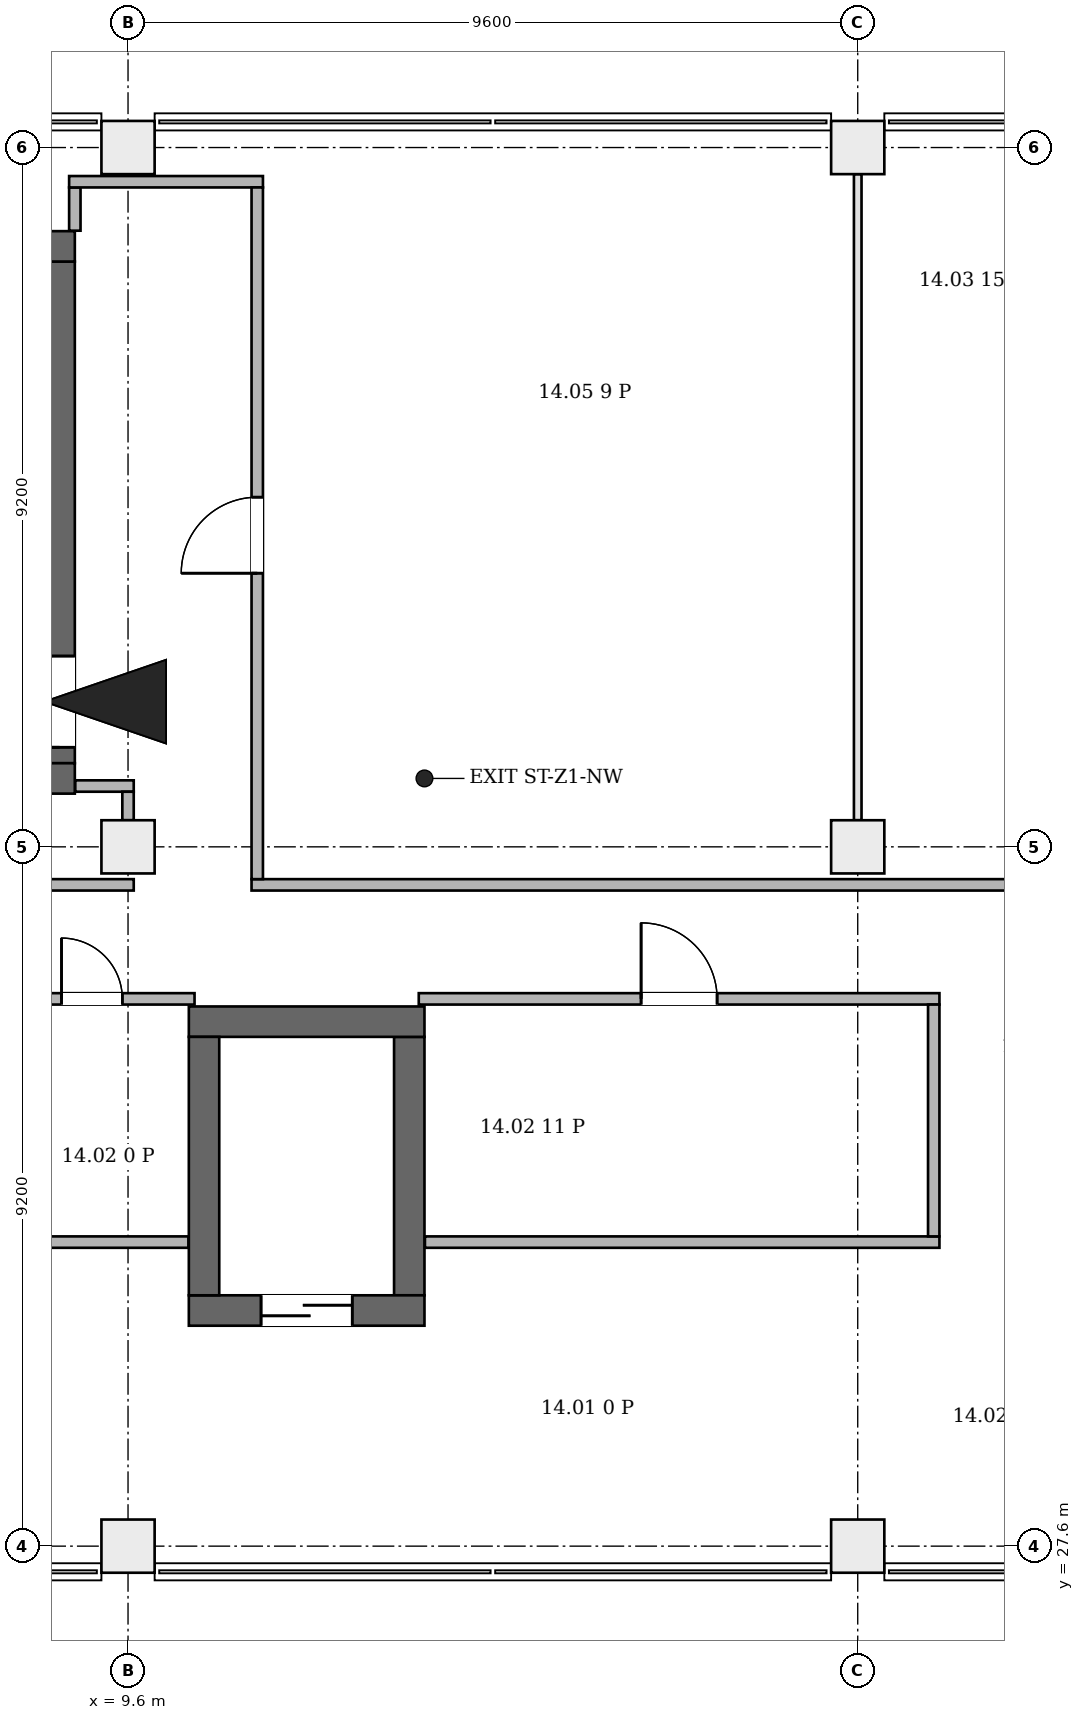
"""IFC4 building model, lengths in metres.
Left out: names, types, materials, properties, quantities, classifications, styles, units other than length and angle.
Written with IfcOpenShell. Run it as: python <this file> out.ifc"""

import sys

from ifc_helpers import new_model, si_unit, direction, frame, frame_2d, origin, origin_2d, place, context, subcontext, project, spatial, rectangle, extrude, element, fill, save


model = new_model("IFC4")
c1 = context("Model", 3, precision=1e-05, world=origin(), true_north=direction((0.0, 1.0)))
c2 = subcontext(c1, "Body", "Model", "MODEL_VIEW")
j1 = project(units=[si_unit("LENGTHUNIT", "METRE"), si_unit("PLANEANGLEUNIT", "RADIAN")], contexts=[c1])
p1 = place(None, origin())
s1 = spatial("IfcSite", under=j1, at=p1, CompositionType="ELEMENT")
p2 = place(p1, origin())
s2 = spatial("IfcBuilding", under=s1, at=p2, CompositionType="ELEMENT")
p3 = place(p2, frame((0.0, 0.0, 69.7)))
s3 = spatial("IfcBuildingStorey", under=s2, at=p3, CompositionType="ELEMENT", Elevation=69.7)
for number, where, z_axis, x_axis in (
    (1, (4.7, 37.7, 0.0), (0.0, 0.0, 1.0), (1.0, 0.0, 0.0)),
    (2, (4.7, 44.7, 0.0), (0.0, 0.0, 1.0), (1.0, 0.0, 0.0)),
):
    element("IfcWall", number, at=place(p3, frame(where, z_axis=z_axis, x_axis=x_axis)), inside=s3, PredefinedType="SHEAR", context=c2, shape_type="SweptSolid", body=[
        extrude(rectangle(XDim=4.2, YDim=0.4, at=frame_2d((2.1, 0.0))), origin(), (0.0, 0.0, 1.0), 4.2),
    ])
p4 = place(p3, frame((8.7, 37.9, 0.0), z_axis=(0.0, 0.0, 1.0), x_axis=(0.0, 1.0, 0.0)))
e3 = element("IfcWall", 3, at=p4, inside=s3, PredefinedType="SHEAR", context=c2, shape_type="SweptSolid", body=[
    extrude(rectangle(XDim=6.6, YDim=0.4, at=frame_2d((3.3, 0.0))), origin(), (0.0, 0.0, 1.0), 4.2),
])
p5 = place(p4, frame((0.21, 0.0, 0.0)))
e4 = element("IfcOpeningElement", 4, at=p5, cuts=e3, PredefinedType="OPENING", context=c2, shape_type="SweptSolid", body=[
    extrude(rectangle(XDim=1.2, YDim=2.1, at=frame_2d((0.6, 1.05))), frame((0.0, 0.21, 0.0), z_axis=(0.0, -1.0, 0.0), x_axis=(1.0, 0.0, 0.0)), (0.0, 0.0, 1.0), 0.42),
])
p6 = place(p3, frame((10.4, 30.7, 0.0), z_axis=(0.0, 0.0, 1.0), x_axis=(1.0, 0.0, 0.0)))
e5 = element("IfcWall", 5, at=p6, inside=s3, PredefinedType="SHEAR", context=c2, shape_type="SweptSolid", body=[
    extrude(rectangle(XDim=3.1, YDim=0.4, at=frame_2d((1.55, 0.0))), origin(), (0.0, 0.0, 1.0), 4.2),
])
p7 = place(p6, frame((0.95, 0.0, 0.0)))
e6 = element("IfcOpeningElement", 6, at=p7, cuts=e5, PredefinedType="OPENING", context=c2, shape_type="SweptSolid", body=[
    extrude(rectangle(XDim=1.2, YDim=2.1, at=frame_2d((0.6, 1.05))), frame((0.0, 0.21, 0.0), z_axis=(0.0, -1.0, 0.0), x_axis=(1.0, 0.0, 0.0)), (0.0, 0.0, 1.0), 0.42),
])
p8 = place(p3, frame((10.4, 34.5, 0.0), z_axis=(0.0, 0.0, 1.0), x_axis=(1.0, 0.0, 0.0)))
e7 = element("IfcWall", 7, at=p8, inside=s3, PredefinedType="SHEAR", context=c2, shape_type="SweptSolid", body=[
    extrude(rectangle(XDim=3.1, YDim=0.4, at=frame_2d((1.55, 0.0))), origin(), (0.0, 0.0, 1.0), 4.2),
])
for number, where, z_axis, x_axis in (
    (8, (10.6, 30.9, 0.0), (0.0, 0.0, 1.0), (0.0, 1.0, 0.0)),
    (9, (13.3, 30.9, 0.0), (0.0, 0.0, 1.0), (0.0, 1.0, 0.0)),
):
    element("IfcWall", number, at=place(p3, frame(where, z_axis=z_axis, x_axis=x_axis)), inside=s3, PredefinedType="SHEAR", context=c2, shape_type="SweptSolid", body=[
        extrude(rectangle(XDim=3.4, YDim=0.4, at=frame_2d((1.7, 0.0))), origin(), (0.0, 0.0, 1.0), 4.2),
    ])
for number, where, z_axis, x_axis in (
    (10, (9.6, 27.6, 0.0), (0.0, 0.0, 1.0), (1.0, 0.0, 0.0)),
    (11, (19.2, 27.6, 0.0), (0.0, 0.0, 1.0), (1.0, 0.0, 0.0)),
    (12, (9.6, 36.8, 0.0), (0.0, 0.0, 1.0), (1.0, 0.0, 0.0)),
    (13, (19.2, 36.8, 0.0), (0.0, 0.0, 1.0), (1.0, 0.0, 0.0)),
    (14, (9.6, 46.0, 0.0), (0.0, 0.0, 1.0), (1.0, 0.0, 0.0)),
    (15, (19.2, 46.0, 0.0), (0.0, 0.0, 1.0), (1.0, 0.0, 0.0)),
):
    element("IfcColumn", number, at=place(p3, frame(where, z_axis=z_axis, x_axis=x_axis)), inside=s3, PredefinedType="COLUMN", context=c2, shape_type="SweptSolid", body=[
        extrude(rectangle(XDim=0.7, YDim=0.7, at=origin_2d()), origin(), (0.0, 0.0, 1.0), 4.2),
    ])
p9 = place(p3, frame((-0.044, 31.6, 0.0), z_axis=(0.0, 0.0, 1.0), x_axis=(1.0, 0.0, 0.0)))
e16 = element("IfcWall", 16, at=p9, inside=s3, PredefinedType="PARTITIONING", context=c2, shape_type="SweptSolid", body=[
    extrude(rectangle(XDim=10.438, YDim=0.15, at=frame_2d((5.219, 0.0))), origin(), (0.0, 0.0, 1.0), 3.9),
])
p10 = place(p3, frame((-0.044, 34.8, 0.0), z_axis=(0.0, 0.0, 1.0), x_axis=(1.0, 0.0, 0.0)))
e17 = element("IfcWall", 17, at=p10, inside=s3, PredefinedType="PARTITIONING", context=c2, shape_type="SweptSolid", body=[
    extrude(rectangle(XDim=10.519, YDim=0.15, at=frame_2d((5.26, 0.0))), origin(), (0.0, 0.0, 1.0), 3.9),
])
p11 = place(p10, frame((0.844, 0.0, 0.0)))
e18 = element("IfcOpeningElement", 18, at=p11, cuts=e17, PredefinedType="OPENING", context=c2, shape_type="SweptSolid", body=[
    extrude(rectangle(XDim=0.9, YDim=2.1, at=frame_2d((0.45, 1.05))), frame((0.0, 0.085, 0.0), z_axis=(0.0, -1.0, 0.0), x_axis=(1.0, 0.0, 0.0)), (0.0, 0.0, 1.0), 0.17),
])
p12 = place(p10, frame((3.469, 0.0, 0.0)))
e19 = element("IfcOpeningElement", 19, at=p12, cuts=e17, PredefinedType="OPENING", context=c2, shape_type="SweptSolid", body=[
    extrude(rectangle(XDim=0.8, YDim=2.1, at=frame_2d((0.4, 1.05))), frame((0.0, 0.085, 0.0), z_axis=(0.0, -1.0, 0.0), x_axis=(1.0, 0.0, 0.0)), (0.0, 0.0, 1.0), 0.17),
])
p13 = place(p10, frame((6.143, 0.0, 0.0)))
e20 = element("IfcOpeningElement", 20, at=p13, cuts=e17, PredefinedType="OPENING", context=c2, shape_type="SweptSolid", body=[
    extrude(rectangle(XDim=0.7, YDim=2.1, at=frame_2d((0.35, 1.05))), frame((0.0, 0.085, 0.0), z_axis=(0.0, -1.0, 0.0), x_axis=(1.0, 0.0, 0.0)), (0.0, 0.0, 1.0), 0.17),
])
p14 = place(p10, frame((8.769, 0.0, 0.0)))
e21 = element("IfcOpeningElement", 21, at=p14, cuts=e17, PredefinedType="OPENING", context=c2, shape_type="SweptSolid", body=[
    extrude(rectangle(XDim=0.8, YDim=2.1, at=frame_2d((0.4, 1.05))), frame((0.0, 0.085, 0.0), z_axis=(0.0, -1.0, 0.0), x_axis=(1.0, 0.0, 0.0)), (0.0, 0.0, 1.0), 0.17),
])
p15 = place(p3, frame((-0.044, 36.3, 0.0), z_axis=(0.0, 0.0, 1.0), x_axis=(1.0, 0.0, 0.0)))
e22 = element("IfcWall", 22, at=p15, inside=s3, PredefinedType="PARTITIONING", context=c2, shape_type="SweptSolid", body=[
    extrude(rectangle(XDim=9.719, YDim=0.15, at=frame_2d((4.859, 0.0))), origin(), (0.0, 0.0, 1.0), 3.9),
])
p16 = place(p15, frame((3.744, 0.0, 0.0)))
e23 = element("IfcOpeningElement", 23, at=p16, cuts=e22, PredefinedType="OPENING", context=c2, shape_type="SweptSolid", body=[
    extrude(rectangle(XDim=1.0, YDim=2.1, at=frame_2d((0.5, 1.05))), frame((0.0, 0.085, 0.0), z_axis=(0.0, -1.0, 0.0), x_axis=(1.0, 0.0, 0.0)), (0.0, 0.0, 1.0), 0.17),
])
p17 = place(p3, frame((8.9, 44.906, 0.0), z_axis=(0.0, 0.0, 1.0), x_axis=(0.0, 1.0, 0.0)))
e24 = element("IfcWall", 24, at=p17, inside=s3, PredefinedType="PARTITIONING", context=c2, shape_type="SweptSolid", body=[
    extrude(rectangle(XDim=0.569, YDim=0.15, at=frame_2d((0.285, 0.0))), origin(), (0.0, 0.0, 1.0), 3.9),
])
p18 = place(p3, frame((8.825, 45.55, 0.0), z_axis=(0.0, 0.0, 1.0), x_axis=(1.0, 0.0, 0.0)))
e25 = element("IfcWall", 25, at=p18, inside=s3, PredefinedType="PARTITIONING", context=c2, shape_type="SweptSolid", body=[
    extrude(rectangle(XDim=2.55, YDim=0.15, at=frame_2d((1.275, 0.0))), origin(), (0.0, 0.0, 1.0), 3.9),
])
p19 = place(p3, frame((8.906, 37.6, 0.0), z_axis=(0.0, 0.0, 1.0), x_axis=(1.0, 0.0, 0.0)))
e26 = element("IfcWall", 26, at=p19, inside=s3, PredefinedType="PARTITIONING", context=c2, shape_type="SweptSolid", body=[
    extrude(rectangle(XDim=0.769, YDim=0.15, at=frame_2d((0.385, 0.0))), origin(), (0.0, 0.0, 1.0), 3.9),
])
p20 = place(p3, frame((9.6, 37.15, 0.0), z_axis=(0.0, 0.0, 1.0), x_axis=(0.0, 1.0, 0.0)))
e27 = element("IfcWall", 27, at=p20, inside=s3, PredefinedType="PARTITIONING", context=c2, shape_type="SweptSolid", body=[
    extrude(rectangle(XDim=0.375, YDim=0.15, at=frame_2d((0.188, 0.0))), origin(), (0.0, 0.0, 1.0), 3.9),
])
p21 = place(p3, frame((11.225, 36.3, 0.0), z_axis=(0.0, 0.0, 1.0), x_axis=(1.0, 0.0, 0.0)))
e28 = element("IfcWall", 28, at=p21, inside=s3, PredefinedType="PARTITIONING", context=c2, shape_type="SweptSolid", body=[
    extrude(rectangle(XDim=11.05, YDim=0.15, at=frame_2d((5.525, 0.0))), origin(), (0.0, 0.0, 1.0), 3.9),
])
p22 = place(p3, frame((11.3, 36.375, 0.0), z_axis=(0.0, 0.0, 1.0), x_axis=(0.0, 1.0, 0.0)))
e29 = element("IfcWall", 29, at=p22, inside=s3, PredefinedType="PARTITIONING", context=c2, shape_type="SweptSolid", body=[
    extrude(rectangle(XDim=9.1, YDim=0.15, at=frame_2d((4.55, 0.0))), origin(), (0.0, 0.0, 1.0), 3.9),
])
p23 = place(p22, frame((4.025, 0.0, 0.0)))
e30 = element("IfcOpeningElement", 30, at=p23, cuts=e29, PredefinedType="OPENING", context=c2, shape_type="SweptSolid", body=[
    extrude(rectangle(XDim=1.0, YDim=2.1, at=frame_2d((0.5, 1.05))), frame((0.0, 0.085, 0.0), z_axis=(0.0, -1.0, 0.0), x_axis=(1.0, 0.0, 0.0)), (0.0, 0.0, 1.0), 0.17),
])
p24 = place(p3, frame((13.425, 34.8, 0.0), z_axis=(0.0, 0.0, 1.0), x_axis=(1.0, 0.0, 0.0)))
e31 = element("IfcWall", 31, at=p24, inside=s3, PredefinedType="PARTITIONING", context=c2, shape_type="SweptSolid", body=[
    extrude(rectangle(XDim=6.85, YDim=0.15, at=frame_2d((3.425, 0.0))), origin(), (0.0, 0.0, 1.0), 3.9),
])
p25 = place(p24, frame((2.925, 0.0, 0.0)))
e32 = element("IfcOpeningElement", 32, at=p25, cuts=e31, PredefinedType="OPENING", context=c2, shape_type="SweptSolid", body=[
    extrude(rectangle(XDim=1.0, YDim=2.1, at=frame_2d((0.5, 1.05))), frame((0.0, 0.085, 0.0), z_axis=(0.0, -1.0, 0.0), x_axis=(1.0, 0.0, 0.0)), (0.0, 0.0, 1.0), 0.17),
])
p26 = place(p3, frame((13.506, 31.6, 0.0), z_axis=(0.0, 0.0, 1.0), x_axis=(1.0, 0.0, 0.0)))
e33 = element("IfcWall", 33, at=p26, inside=s3, PredefinedType="PARTITIONING", context=c2, shape_type="SweptSolid", body=[
    extrude(rectangle(XDim=6.769, YDim=0.15, at=frame_2d((3.384, 0.0))), origin(), (0.0, 0.0, 1.0), 3.9),
])
p27 = place(p3, frame((19.2, 37.15, 0.0), z_axis=(0.0, 0.0, 1.0), x_axis=(0.0, 1.0, 0.0)))
e34 = element("IfcWall", 34, at=p27, inside=s3, PredefinedType="PARTITIONING", context=c2, shape_type="SweptSolid", body=[
    extrude(rectangle(XDim=8.5, YDim=0.1, at=frame_2d((4.25, 0.0))), origin(), (0.0, 0.0, 1.0), 3.9),
])
p28 = place(p3, frame((20.2, 31.675, 0.0), z_axis=(0.0, 0.0, 1.0), x_axis=(0.0, 1.0, 0.0)))
e35 = element("IfcWall", 35, at=p28, inside=s3, PredefinedType="PARTITIONING", context=c2, shape_type="SweptSolid", body=[
    extrude(rectangle(XDim=3.05, YDim=0.15, at=frame_2d((1.525, 0.0))), origin(), (0.0, 0.0, 1.0), 3.9),
])
p29 = place(p5, origin())
e36 = element("IfcDoor", 36, at=p29, inside=s3, OperationType="SINGLE_SWING_RIGHT", PredefinedType="DOOR", context=c2, shape_type="SweptSolid", body=[
    extrude(rectangle(XDim=1.2, YDim=2.1, at=frame_2d((0.6, 1.05))), frame((0.0, 0.025, 0.0), z_axis=(0.0, -1.0, 0.0), x_axis=(1.0, 0.0, 0.0)), (0.0, 0.0, 1.0), 0.05),
])
fill(e4, e36)
p30 = place(p7, origin())
e37 = element("IfcDoor", 37, at=p30, inside=s3, OperationType="DOUBLE_DOOR_SLIDING", PredefinedType="DOOR", context=c2, shape_type="SweptSolid", body=[
    extrude(rectangle(XDim=1.2, YDim=2.1, at=frame_2d((0.6, 1.05))), frame((0.0, 0.025, 0.0), z_axis=(0.0, -1.0, 0.0), x_axis=(1.0, 0.0, 0.0)), (0.0, 0.0, 1.0), 0.05),
])
fill(e6, e37)
p31 = place(p14, origin())
e38 = element("IfcDoor", 38, at=p31, inside=s3, OperationType="SINGLE_SWING_LEFT", PredefinedType="DOOR", context=c2, shape_type="SweptSolid", body=[
    extrude(rectangle(XDim=0.8, YDim=2.1, at=frame_2d((0.4, 1.05))), frame((0.0, 0.025, 0.0), z_axis=(0.0, -1.0, 0.0), x_axis=(1.0, 0.0, 0.0)), (0.0, 0.0, 1.0), 0.05),
])
fill(e21, e38)
p32 = place(p25, origin())
e39 = element("IfcDoor", 39, at=p32, inside=s3, OperationType="SINGLE_SWING_RIGHT", PredefinedType="DOOR", context=c2, shape_type="SweptSolid", body=[
    extrude(rectangle(XDim=1.0, YDim=2.1, at=frame_2d((0.5, 1.05))), frame((0.0, 0.025, 0.0), z_axis=(0.0, -1.0, 0.0), x_axis=(1.0, 0.0, 0.0)), (0.0, 0.0, 1.0), 0.05),
])
fill(e32, e39)
p33 = place(p23, origin())
e40 = element("IfcDoor", 40, at=p33, inside=s3, OperationType="SINGLE_SWING_LEFT", PredefinedType="DOOR", context=c2, shape_type="SweptSolid", body=[
    extrude(rectangle(XDim=1.0, YDim=2.1, at=frame_2d((0.5, 1.05))), frame((0.0, 0.025, 0.0), z_axis=(0.0, -1.0, 0.0), x_axis=(1.0, 0.0, 0.0)), (0.0, 0.0, 1.0), 0.05),
])
fill(e30, e40)
save(model, sys.argv[1])
